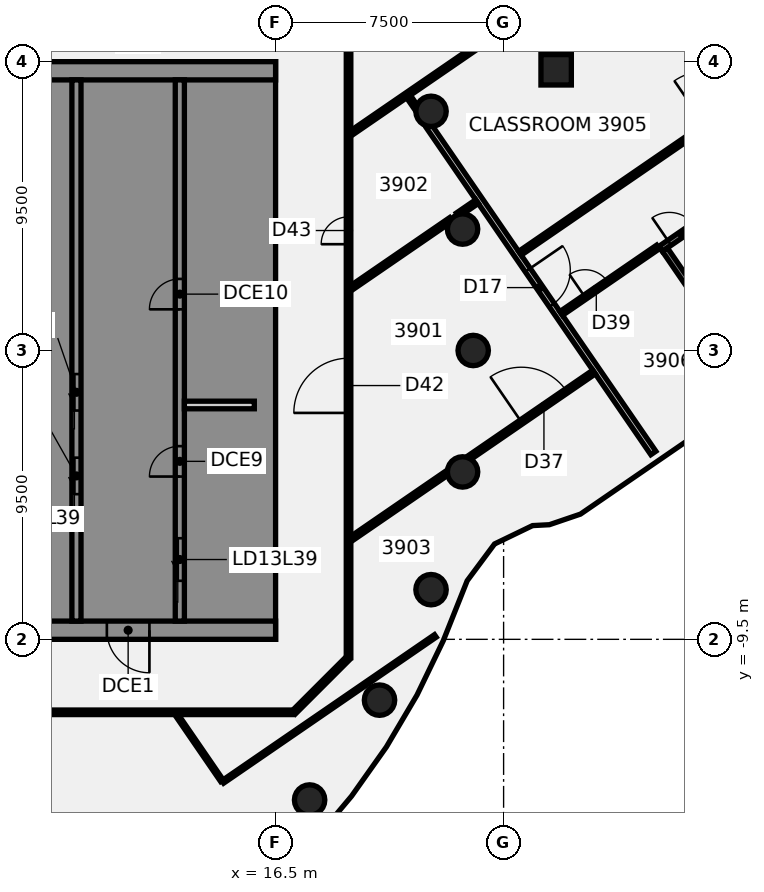
"""IFC4 building model, lengths in metres.
Left out: names, types, materials, properties, quantities, classifications, styles, units other than length and angle.
Written with IfcOpenShell. Run it as: python <this file> out.ifc"""

import sys

from ifc_helpers import new_model, si_unit, direction, frame, frame_2d, origin, origin_2d, place, context, subcontext, project, spatial, polyline, rectangle, circle, outline, extrude, element, fill, save


model = new_model("IFC4")
c1 = context("Model", 3, precision=1e-05, world=origin(), true_north=direction((0.0, 1.0)))
c2 = subcontext(c1, "Body", "Model", "MODEL_VIEW")
j1 = project(units=[si_unit("LENGTHUNIT", "METRE"), si_unit("PLANEANGLEUNIT", "RADIAN")], contexts=[c1])
p1 = place(None, origin())
s1 = spatial("IfcSite", under=j1, at=p1, CompositionType="ELEMENT")
p2 = place(p1, origin())
s2 = spatial("IfcBuilding", under=s1, at=p2, CompositionType="ELEMENT")
p3 = place(p2, frame((0.0, 0.0, 159.25)))
s3 = spatial("IfcBuildingStorey", under=s2, at=p3, CompositionType="ELEMENT", Elevation=159.25)
for number, where, z_axis, x_axis in (
    (1, (23.0, 0.0, -0.14), (0.0, 0.0, 1.0), (1.0, 0.0, 0.0)),
    (2, (22.651, 3.994, -0.14), (0.0, 0.0, 1.0), (1.0, 0.0, 0.0)),
    (3, (21.613, 7.866, -0.14), (0.0, 0.0, 1.0), (1.0, 0.0, 0.0)),
    (4, (17.619, -14.784, -0.14), (0.0, 0.0, 1.0), (1.0, 0.0, 0.0)),
    (5, (19.919, -11.5, -0.14), (0.0, 0.0, 1.0), (1.0, 0.0, 0.0)),
    (6, (21.613, -7.866, -0.14), (0.0, 0.0, 1.0), (1.0, 0.0, 0.0)),
    (7, (22.651, -3.994, -0.14), (0.0, 0.0, 1.0), (1.0, 0.0, 0.0)),
):
    element("IfcColumn", number, at=place(p3, frame(where, z_axis=z_axis, x_axis=x_axis)), inside=s3, PredefinedType="COLUMN", context=c2, shape_type="SweptSolid", body=[
        extrude(circle(Radius=0.5, at=origin_2d()), origin(), (0.0, 0.0, 1.0), 3.75),
    ])
p4 = place(p3, frame((25.729, 9.232, -0.139), z_axis=(-0.045031564951, 0.017700268305, 0.998828743409), x_axis=(0.565346981638, -0.82387846187, 0.040088282815)))
e8 = element("IfcColumn", 8, at=p4, inside=s3, PredefinedType="COLUMN", context=c2, shape_type="SweptSolid", body=[
    extrude(rectangle(XDim=1.0, YDim=1.0, at=origin_2d()), origin(), (0.0, 0.0, 1.0), 3.752),
])
p5 = place(p3, frame((2.344, -11.987, 0.0), z_axis=(0.0, 0.0, 1.0), x_axis=(0.566059881592, -0.824364124918, 0.0)))
e9 = element("IfcWall", 9, at=p5, inside=s3, PredefinedType="PARTITIONING", context=c2, shape_type="SweptSolid", body=[
    extrude(rectangle(XDim=13.547, YDim=0.1, at=frame_2d((6.773, 0.0))), origin(), (0.0, 0.0, 1.0), 3.01),
])
p6 = place(p3, frame((13.249, -11.987, 0.0), z_axis=(0.0, 0.0, 1.0), x_axis=(0.566181157167, -0.824280836408, 0.0)))
e10 = element("IfcWall", 10, at=p6, inside=s3, PredefinedType="PARTITIONING", context=c2, shape_type="SweptSolid", body=[
    extrude(rectangle(XDim=2.623, YDim=0.1, at=frame_2d((1.312, 0.0))), origin(), (0.0, 0.0, 1.0), 3.01),
])
p7 = place(p3, frame((20.875, 8.35, 0.0), z_axis=(0.0, 0.0, 1.0), x_axis=(0.56618647865, -0.824277181168, 0.0)))
e11 = element("IfcWall", 11, at=p7, inside=s3, PredefinedType="PARTITIONING", context=c2, shape_type="SweptSolid", body=[
    extrude(rectangle(XDim=0.454, YDim=0.15, at=frame_2d((0.227, 0.0))), origin(), (0.0, 0.0, 1.0), 3.01),
])
p8 = place(p3, frame((21.545, 7.375, 0.0), z_axis=(0.0, 0.0, 1.0), x_axis=(0.566178235937, -0.824282842932, 0.0)))
e12 = element("IfcWall", 12, at=p8, inside=s3, PredefinedType="PARTITIONING", context=c2, shape_type="SweptSolid", body=[
    extrude(rectangle(XDim=13.035, YDim=0.2, at=frame_2d((6.518, 0.0))), origin(), (0.0, 0.0, 1.0), 3.01),
])
p9 = place(p8, frame((5.737, 0.0, 0.0)))
e13 = element("IfcOpeningElement", 13, at=p9, cuts=e12, PredefinedType="OPENING", context=c2, shape_type="SweptSolid", body=[
    extrude(rectangle(XDim=1.4, YDim=2.1, at=frame_2d((0.7, 1.05))), frame((0.0, 0.11, 0.0), z_axis=(0.0, -1.0, 0.0), x_axis=(1.0, 0.0, 0.0)), (0.0, 0.0, 1.0), 0.22),
])
p10 = place(p3, frame((-17.1, -11.9, 0.0), z_axis=(0.0, 0.0, 1.0), x_axis=(1.0, 0.0, 0.0)))
e14 = element("IfcWall", 14, at=p10, inside=s3, PredefinedType="PARTITIONING", context=c2, shape_type="SweptSolid", body=[
    extrude(rectangle(XDim=34.165, YDim=0.15, at=frame_2d((17.083, 0.0))), origin(), (0.0, 0.0, 1.0), 3.01),
])
p11 = place(p10, frame((9.777, 0.0, 0.0)))
e15 = element("IfcOpeningElement", 15, at=p11, cuts=e14, PredefinedType="OPENING", context=c2, shape_type="SweptSolid", body=[
    extrude(rectangle(XDim=1.8, YDim=2.1, at=frame_2d((0.9, 1.05))), frame((0.0, 0.085, 0.0), z_axis=(0.0, -1.0, 0.0), x_axis=(1.0, 0.0, 0.0)), (0.0, 0.0, 1.0), 0.17),
])
p12 = place(p10, frame((1.95, 0.0, 0.0)))
e16 = element("IfcOpeningElement", 16, at=p12, cuts=e14, PredefinedType="OPENING", context=c2, shape_type="SweptSolid", body=[
    extrude(rectangle(XDim=1.8, YDim=2.1, at=frame_2d((0.9, 1.05))), frame((0.0, 0.085, 0.0), z_axis=(0.0, -1.0, 0.0), x_axis=(1.0, 0.0, 0.0)), (0.0, 0.0, 1.0), 0.17),
])
p13 = place(p10, frame((23.884, 0.0, 0.0)))
e17 = element("IfcOpeningElement", 17, at=p13, cuts=e14, PredefinedType="OPENING", context=c2, shape_type="SweptSolid", body=[
    extrude(rectangle(XDim=1.8, YDim=2.1, at=frame_2d((0.9, 1.05))), frame((0.0, 0.085, 0.0), z_axis=(0.0, -1.0, 0.0), x_axis=(1.0, 0.0, 0.0)), (0.0, 0.0, 1.0), 0.17),
])
p14 = place(p3, frame((14.762, -14.19, 0.0), z_axis=(0.0, 0.0, 1.0), x_axis=(0.824347457756, 0.566084153542, 0.0)))
e18 = element("IfcWall", 18, at=p14, inside=s3, PredefinedType="PARTITIONING", context=c2, shape_type="SweptSolid", body=[
    extrude(rectangle(XDim=8.483, YDim=0.1, at=frame_2d((4.242, 0.0))), origin(), (0.0, 0.0, 1.0), 3.01),
])
p15 = place(p3, frame((18.999, -6.185, 0.0), z_axis=(0.0, 0.0, 1.0), x_axis=(0.824392319221, 0.566018819484, 0.0)))
e19 = element("IfcWall", 19, at=p15, inside=s3, PredefinedType="PARTITIONING", context=c2, shape_type="SweptSolid", body=[
    extrude(rectangle(XDim=3.82, YDim=0.15, at=frame_2d((1.91, 0.0))), origin(), (0.0, 0.0, 1.0), 3.01),
])
p16 = place(p3, frame((22.854, -3.538, 0.0), z_axis=(0.0, 0.0, 1.0), x_axis=(0.824360979783, 0.566064461887, 0.0)))
e20 = element("IfcWall", 20, at=p16, inside=s3, PredefinedType="PARTITIONING", context=c2, shape_type="SweptSolid", body=[
    extrude(rectangle(XDim=4.999, YDim=0.15, at=frame_2d((2.5, 0.0))), origin(), (0.0, 0.0, 1.0), 3.01),
])
p17 = place(p16, frame((2.1, 0.0, 0.0)))
e21 = element("IfcOpeningElement", 21, at=p17, cuts=e20, PredefinedType="OPENING", context=c2, shape_type="SweptSolid", body=[
    extrude(rectangle(XDim=1.8, YDim=2.1, at=frame_2d((0.9, 1.05))), frame((0.0, 0.085, 0.0), z_axis=(0.0, -1.0, 0.0), x_axis=(1.0, 0.0, 0.0)), (0.0, 0.0, 1.0), 0.17),
])
p18 = place(p3, frame((18.999, 2.064, 0.0), z_axis=(0.0, 0.0, 1.0), x_axis=(0.824390062348, 0.566022106549, 0.0)))
e22 = element("IfcWall", 22, at=p18, inside=s3, PredefinedType="PARTITIONING", context=c2, shape_type="SweptSolid", body=[
    extrude(rectangle(XDim=3.968, YDim=0.15, at=frame_2d((1.984, 0.0))), origin(), (0.0, 0.0, 1.0), 3.01),
])
p19 = place(p3, frame((22.49, 4.461, 0.0), z_axis=(0.0, 0.0, 1.0), x_axis=(0.82422658894, 0.566260125812, 0.0)))
e23 = element("IfcWall", 23, at=p19, inside=s3, PredefinedType="PARTITIONING", context=c2, shape_type="SweptSolid", body=[
    extrude(rectangle(XDim=0.771, YDim=0.15, at=frame_2d((0.386, 0.0))), origin(), (0.0, 0.0, 1.0), 3.01),
])
p20 = place(p3, frame((18.999, 7.159, 0.0), z_axis=(0.0, 0.0, 1.0), x_axis=(0.824433154218, 0.565959339728, 0.0)))
e24 = element("IfcWall", 24, at=p20, inside=s3, PredefinedType="PARTITIONING", context=c2, shape_type="SweptSolid", body=[
    extrude(rectangle(XDim=5.041, YDim=0.15, at=frame_2d((2.521, 0.0))), origin(), (0.0, 0.0, 1.0), 3.01),
])
p21 = place(p3, frame((24.54, 3.199, 0.0), z_axis=(0.0, 0.0, 1.0), x_axis=(0.824324281839, 0.566117901475, 0.0)))
e25 = element("IfcWall", 25, at=p21, inside=s3, PredefinedType="PARTITIONING", context=c2, shape_type="SweptSolid", body=[
    extrude(rectangle(XDim=13.316, YDim=0.15, at=frame_2d((6.658, 0.0))), origin(), (0.0, 0.0, 1.0), 3.01),
])
p22 = place(p21, frame((7.395, 0.0, 0.0)))
e26 = element("IfcOpeningElement", 26, at=p22, cuts=e25, PredefinedType="OPENING", context=c2, shape_type="SweptSolid", body=[
    extrude(rectangle(XDim=1.8, YDim=2.1, at=frame_2d((0.9, 1.05))), frame((0.0, 0.085, 0.0), z_axis=(0.0, -1.0, 0.0), x_axis=(1.0, 0.0, 0.0)), (0.0, 0.0, 1.0), 0.17),
])
p23 = place(p3, frame((25.894, 1.219, 0.0), z_axis=(0.0, 0.0, 1.0), x_axis=(0.82439240616, 0.566018692859, 0.0)))
e27 = element("IfcWall", 27, at=p23, inside=s3, PredefinedType="PARTITIONING", context=c2, shape_type="SweptSolid", body=[
    extrude(rectangle(XDim=3.86, YDim=0.15, at=frame_2d((1.93, 0.0))), origin(), (0.0, 0.0, 1.0), 3.01),
])
p24 = place(p23, frame((0.95, 0.0, 0.0)))
e28 = element("IfcOpeningElement", 28, at=p24, cuts=e27, PredefinedType="OPENING", context=c2, shape_type="SweptSolid", body=[
    extrude(rectangle(XDim=0.9, YDim=2.1, at=frame_2d((0.45, 1.05))), frame((0.0, 0.085, 0.0), z_axis=(0.0, -1.0, 0.0), x_axis=(1.0, 0.0, 0.0)), (0.0, 0.0, 1.0), 0.17),
])
p25 = place(p3, frame((17.1, -11.9, 0.0), z_axis=(0.0, 0.0, 1.0), x_axis=(0.707106781187, 0.707106781187, 0.0)))
e29 = element("IfcWall", 29, at=p25, inside=s3, PredefinedType="PARTITIONING", context=c2, shape_type="SweptSolid", body=[
    extrude(rectangle(XDim=2.505, YDim=0.15, at=frame_2d((1.253, 0.0))), origin(), (0.0, 0.0, 1.0), 3.01),
])
p26 = place(p3, frame((18.9, -10.1, 0.0), z_axis=(0.0, 0.0, 1.0), x_axis=(0.0, 1.0, 0.0)))
e30 = element("IfcWall", 30, at=p26, inside=s3, PredefinedType="PARTITIONING", context=c2, shape_type="SweptSolid", body=[
    extrude(rectangle(XDim=20.2, YDim=0.15, at=frame_2d((10.1, 0.0))), origin(), (0.0, 0.0, 1.0), 3.01),
])
p27 = place(p26, frame((8.047, 0.0, 0.0)))
e31 = element("IfcOpeningElement", 31, at=p27, cuts=e30, PredefinedType="OPENING", context=c2, shape_type="SweptSolid", body=[
    extrude(rectangle(XDim=1.8, YDim=2.1, at=frame_2d((0.9, 1.05))), frame((0.0, 0.085, 0.0), z_axis=(0.0, -1.0, 0.0), x_axis=(1.0, 0.0, 0.0)), (0.0, 0.0, 1.0), 0.17),
])
p28 = place(p26, frame((13.596, 0.0, 0.0)))
e32 = element("IfcOpeningElement", 32, at=p28, cuts=e30, PredefinedType="OPENING", context=c2, shape_type="SweptSolid", body=[
    extrude(rectangle(XDim=0.9, YDim=2.1, at=frame_2d((0.45, 1.05))), frame((0.0, 0.085, 0.0), z_axis=(0.0, -1.0, 0.0), x_axis=(1.0, 0.0, 0.0)), (0.0, 0.0, 1.0), 0.17),
])
p29 = place(p3, frame((16.5, -9.2, 0.0), z_axis=(0.0, 0.0, 1.0), x_axis=(-1.0, 0.0, 0.0)))
e33 = element("IfcWall", 33, at=p29, inside=s3, PredefinedType="SHEAR", context=c2, shape_type="SweptSolid", body=[
    extrude(rectangle(XDim=13.0, YDim=0.6, at=frame_2d((6.5, 0.0))), origin(), (0.0, 0.0, 1.0), 3.61),
])
p30 = place(p29, frame((4.15, 0.0, 0.0)))
e34 = element("IfcOpeningElement", 34, at=p30, cuts=e33, PredefinedType="OPENING", context=c2, shape_type="SweptSolid", body=[
    extrude(rectangle(XDim=1.4, YDim=2.1, at=frame_2d((0.7, 1.05))), frame((0.0, 0.31, 0.0), z_axis=(0.0, -1.0, 0.0), x_axis=(1.0, 0.0, 0.0)), (0.0, 0.0, 1.0), 0.62),
])
p31 = place(p29, frame((10.125, 0.0, 0.0)))
e35 = element("IfcOpeningElement", 35, at=p31, cuts=e33, PredefinedType="OPENING", context=c2, shape_type="SweptSolid", body=[
    extrude(rectangle(XDim=1.4, YDim=2.1, at=frame_2d((0.7, 1.05))), frame((0.0, 0.31, 0.0), z_axis=(0.0, -1.0, 0.0), x_axis=(1.0, 0.0, 0.0)), (0.0, 0.0, 1.0), 0.62),
])
p32 = place(p3, origin())
e36 = element("IfcWall", 36, at=p32, inside=s3, PredefinedType="SHEAR", context=c2, shape_type="SweptSolid", body=[
    extrude(outline(polyline([(13.5, -8.125), (13.5, -8.9), (15.9, -8.9), (16.5, -8.9), (16.5, 8.9), (15.9, 8.9), (13.5, 8.9), (13.5, 8.125), (15.9, 8.125), (15.9, 5.625), (13.5, 5.625), (13.5, 5.375), (15.9, 5.375), (15.9, -5.375), (13.5, -5.375), (13.5, -5.625), (15.9, -5.625), (15.9, -8.125), (13.5, -8.125)])), origin(), (0.0, 0.0, 1.0), 3.61),
])
p33 = place(p3, frame((16.5, 9.2, 0.0), z_axis=(0.0, 0.0, 1.0), x_axis=(-1.0, 0.0, 0.0)))
e37 = element("IfcWall", 37, at=p33, inside=s3, PredefinedType="SHEAR", context=c2, shape_type="SweptSolid", body=[
    extrude(rectangle(XDim=13.0, YDim=0.6, at=frame_2d((6.5, 0.0))), origin(), (0.0, 0.0, 1.0), 3.61),
])
p34 = place(p3, origin())
e38 = element("IfcWall", 38, at=p34, inside=s3, PredefinedType="SHEAR", context=c2, shape_type="SweptSolid", body=[
    extrude(outline(polyline([(9.8, -5.375), (7.5, -5.375), (7.5, -2.875), (9.8, -2.875), (9.8, -2.625), (7.5, -2.625), (7.5, -0.125), (9.8, -0.125), (9.8, 0.125), (7.5, 0.125), (7.5, 2.625), (9.8, 2.625), (9.8, 2.875), (7.5, 2.875), (7.5, 5.375), (9.8, 5.375), (9.8, 5.625), (7.5, 5.625), (7.5, 8.125), (9.8, 8.125), (9.8, 8.9), (7.5, 8.9), (7.2, 8.9), (7.2, -5.625), (7.5, -5.625), (9.8, -5.625), (9.8, -5.375)])), origin(), (0.0, 0.0, 1.0), 3.61),
])
p35 = place(p3, origin())
e39 = element("IfcWall", 39, at=p35, inside=s3, PredefinedType="SHEAR", context=c2, shape_type="SweptSolid", body=[
    extrude(outline(polyline([(7.5, -8.125), (7.5, -8.9), (9.8, -8.9), (9.8, -8.125), (9.8, -5.625), (9.55, -5.625), (9.55, -8.125), (7.5, -8.125)])), origin(), (0.0, 0.0, 1.0), 3.61),
])
p36 = place(p3, frame((13.35, -8.9, 0.0), z_axis=(0.0, 0.0, 1.0), x_axis=(0.0, 1.0, 0.0)))
e40 = element("IfcWall", 40, at=p36, inside=s3, PredefinedType="SHEAR", context=c2, shape_type="SweptSolid", body=[
    extrude(rectangle(XDim=17.8, YDim=0.3, at=frame_2d((8.9, 0.0))), origin(), (0.0, 0.0, 1.0), 3.61),
])
p37 = place(p36, frame((1.325, 0.0, 0.0)))
e41 = element("IfcOpeningElement", 41, at=p37, cuts=e40, PredefinedType="OPENING", context=c2, shape_type="SweptSolid", body=[
    extrude(rectangle(XDim=1.4, YDim=2.1, at=frame_2d((0.7, 1.05))), frame((0.0, 0.16, 0.0), z_axis=(0.0, -1.0, 0.0), x_axis=(1.0, 0.0, 0.0)), (0.0, 0.0, 1.0), 0.32),
])
p38 = place(p36, frame((4.754, 0.0, 0.0)))
e42 = element("IfcOpeningElement", 42, at=p38, cuts=e40, PredefinedType="OPENING", context=c2, shape_type="SweptSolid", body=[
    extrude(rectangle(XDim=1.0, YDim=2.1, at=frame_2d((0.5, 1.05))), frame((0.0, 0.16, 0.0), z_axis=(0.0, -1.0, 0.0), x_axis=(1.0, 0.0, 0.0)), (0.0, 0.0, 1.0), 0.32),
])
p39 = place(p36, frame((10.254, 0.0, 0.0)))
e43 = element("IfcOpeningElement", 43, at=p39, cuts=e40, PredefinedType="OPENING", context=c2, shape_type="SweptSolid", body=[
    extrude(rectangle(XDim=1.0, YDim=2.1, at=frame_2d((0.5, 1.05))), frame((0.0, 0.16, 0.0), z_axis=(0.0, -1.0, 0.0), x_axis=(1.0, 0.0, 0.0)), (0.0, 0.0, 1.0), 0.32),
])
p40 = place(p3, frame((9.95, -8.9, 0.0), z_axis=(0.0, 0.0, 1.0), x_axis=(0.0, 1.0, 0.0)))
e44 = element("IfcWall", 44, at=p40, inside=s3, PredefinedType="SHEAR", context=c2, shape_type="SweptSolid", body=[
    extrude(rectangle(XDim=17.8, YDim=0.3, at=frame_2d((8.9, 0.0))), origin(), (0.0, 0.0, 1.0), 3.61),
])
p41 = place(p40, frame((4.175, 0.0, 0.0)))
e45 = element("IfcOpeningElement", 45, at=p41, cuts=e44, PredefinedType="OPENING", context=c2, shape_type="SweptSolid", body=[
    extrude(rectangle(XDim=1.2, YDim=2.1, at=frame_2d((0.6, 1.05))), frame((0.0, 0.16, 0.0), z_axis=(0.0, -1.0, 0.0), x_axis=(1.0, 0.0, 0.0)), (0.0, 0.0, 1.0), 0.32),
])
p42 = place(p40, frame((6.925, 0.0, 0.0)))
e46 = element("IfcOpeningElement", 46, at=p42, cuts=e44, PredefinedType="OPENING", context=c2, shape_type="SweptSolid", body=[
    extrude(rectangle(XDim=1.2, YDim=2.1, at=frame_2d((0.6, 1.05))), frame((0.0, 0.16, 0.0), z_axis=(0.0, -1.0, 0.0), x_axis=(1.0, 0.0, 0.0)), (0.0, 0.0, 1.0), 0.32),
])
p43 = place(p3, frame((15.8, -1.792, 0.0), z_axis=(0.0, 0.0, 1.0), x_axis=(-1.0, 0.0, 0.0)))
e47 = element("IfcWall", 47, at=p43, inside=s3, PredefinedType="PARTITIONING", context=c2, shape_type="SweptSolid", body=[
    extrude(rectangle(XDim=2.3, YDim=0.25, at=frame_2d((1.15, 0.0))), origin(), (0.0, 0.0, 1.0), 3.61),
])
p44 = place(p3, frame((29.166, 3.344, -0.14), z_axis=(0.0, 0.0, 1.0), x_axis=(0.824341639897, 0.566092625577, 0.0)))
e48 = element("IfcWall", 48, at=p44, inside=s3, PredefinedType="SHEAR", context=c2, shape_type="SweptSolid", body=[
    extrude(rectangle(XDim=6.7, YDim=0.2, at=frame_2d((3.35, 0.0))), origin(), (0.0, 0.0, 1.0), 3.15),
])
p45 = place(p44, frame((0.35, 0.0, 0.0)))
e49 = element("IfcOpeningElement", 49, at=p45, cuts=e48, PredefinedType="OPENING", context=c2, shape_type="SweptSolid", body=[
    extrude(rectangle(XDim=1.0, YDim=2.1, at=frame_2d((0.5, 1.05))), frame((0.0, 0.11, 0.0), z_axis=(0.0, -1.0, 0.0), x_axis=(1.0, 0.0, 0.0)), (0.0, 0.0, 1.0), 0.22),
])
p46 = place(p3, frame((31.116, 0.68, -0.14), z_axis=(0.0, 0.0, 1.0), x_axis=(-0.566091628667, 0.824342324494, 0.0)))
e50 = element("IfcWall", 50, at=p46, inside=s3, PredefinedType="SHEAR", context=c2, shape_type="SweptSolid", body=[
    extrude(rectangle(XDim=3.2, YDim=0.2, at=frame_2d((1.6, 0.0))), origin(), (0.0, 0.0, 1.0), 3.15),
])
p47 = place(p9, frame((1.4, 0.0, 0.0), z_axis=(0.0, 0.0, 1.0), x_axis=(-1.0, 0.0, 0.0)))
e51 = element("IfcDoor", 51, at=p47, inside=s3, OperationType="DOUBLE_DOOR_SINGLE_SWING", PredefinedType="DOOR", context=c2, shape_type="SweptSolid", body=[
    extrude(rectangle(XDim=1.4, YDim=2.1, at=frame_2d((0.7, 1.05))), frame((0.0, 0.025, 0.0), z_axis=(0.0, -1.0, 0.0), x_axis=(1.0, 0.0, 0.0)), (0.0, 0.0, 1.0), 0.05),
])
fill(e13, e51)
p48 = place(p17, frame((1.8, 0.0, 0.0), z_axis=(0.0, 0.0, 1.0), x_axis=(-1.0, 0.0, 0.0)))
e52 = element("IfcDoor", 52, at=p48, inside=s3, OperationType="DOUBLE_DOOR_SINGLE_SWING", PredefinedType="DOOR", context=c2, shape_type="SweptSolid", body=[
    extrude(rectangle(XDim=1.8, YDim=2.1, at=frame_2d((0.9, 1.05))), frame((0.0, 0.025, 0.0), z_axis=(0.0, -1.0, 0.0), x_axis=(1.0, 0.0, 0.0)), (0.0, 0.0, 1.0), 0.05),
])
fill(e21, e52)
p49 = place(p24, frame((0.9, 0.0, 0.0), z_axis=(0.0, 0.0, 1.0), x_axis=(-1.0, 0.0, 0.0)))
e53 = element("IfcDoor", 53, at=p49, inside=s3, OperationType="SINGLE_SWING_LEFT", PredefinedType="DOOR", context=c2, shape_type="SweptSolid", body=[
    extrude(rectangle(XDim=0.9, YDim=2.1, at=frame_2d((0.45, 1.05))), frame((0.0, 0.025, 0.0), z_axis=(0.0, -1.0, 0.0), x_axis=(1.0, 0.0, 0.0)), (0.0, 0.0, 1.0), 0.05),
])
fill(e28, e53)
p50 = place(p27, origin())
e54 = element("IfcDoor", 54, at=p50, inside=s3, OperationType="DOUBLE_DOOR_SINGLE_SWING", PredefinedType="DOOR", context=c2, shape_type="SweptSolid", body=[
    extrude(rectangle(XDim=1.8, YDim=2.1, at=frame_2d((0.9, 1.05))), frame((0.0, 0.025, 0.0), z_axis=(0.0, -1.0, 0.0), x_axis=(1.0, 0.0, 0.0)), (0.0, 0.0, 1.0), 0.05),
])
fill(e31, e54)
p51 = place(p28, frame((0.9, 0.0, 0.0), z_axis=(0.0, 0.0, 1.0), x_axis=(-1.0, 0.0, 0.0)))
e55 = element("IfcDoor", 55, at=p51, inside=s3, OperationType="SINGLE_SWING_RIGHT", PredefinedType="DOOR", context=c2, shape_type="SweptSolid", body=[
    extrude(rectangle(XDim=0.9, YDim=2.1, at=frame_2d((0.45, 1.05))), frame((0.0, 0.025, 0.0), z_axis=(0.0, -1.0, 0.0), x_axis=(1.0, 0.0, 0.0)), (0.0, 0.0, 1.0), 0.05),
])
fill(e32, e55)
p52 = place(p30, origin())
e56 = element("IfcDoor", 56, at=p52, inside=s3, OperationType="SINGLE_SWING_LEFT", PredefinedType="DOOR", context=c2, shape_type="SweptSolid", body=[
    extrude(rectangle(XDim=1.4, YDim=2.1, at=frame_2d((0.7, 1.05))), frame((0.0, 0.025, 0.0), z_axis=(0.0, -1.0, 0.0), x_axis=(1.0, 0.0, 0.0)), (0.0, 0.0, 1.0), 0.05),
])
fill(e34, e56)
p53 = place(p37, origin())
e57 = element("IfcDoor", 57, at=p53, inside=s3, OperationType="SLIDING_TO_LEFT", PredefinedType="DOOR", context=c2, shape_type="SweptSolid", body=[
    extrude(rectangle(XDim=1.4, YDim=2.1, at=frame_2d((0.7, 1.05))), frame((0.0, 0.025, 0.0), z_axis=(0.0, -1.0, 0.0), x_axis=(1.0, 0.0, 0.0)), (0.0, 0.0, 1.0), 0.05),
])
fill(e41, e57)
p54 = place(p41, origin())
e58 = element("IfcDoor", 58, at=p54, inside=s3, OperationType="SLIDING_TO_LEFT", PredefinedType="DOOR", context=c2, shape_type="SweptSolid", body=[
    extrude(rectangle(XDim=1.2, YDim=2.1, at=frame_2d((0.6, 1.05))), frame((0.0, 0.025, 0.0), z_axis=(0.0, -1.0, 0.0), x_axis=(1.0, 0.0, 0.0)), (0.0, 0.0, 1.0), 0.05),
])
fill(e45, e58)
p55 = place(p42, origin())
e59 = element("IfcDoor", 59, at=p55, inside=s3, OperationType="SLIDING_TO_LEFT", PredefinedType="DOOR", context=c2, shape_type="SweptSolid", body=[
    extrude(rectangle(XDim=1.2, YDim=2.1, at=frame_2d((0.6, 1.05))), frame((0.0, 0.025, 0.0), z_axis=(0.0, -1.0, 0.0), x_axis=(1.0, 0.0, 0.0)), (0.0, 0.0, 1.0), 0.05),
])
fill(e46, e59)
p56 = place(p38, origin())
e60 = element("IfcDoor", 60, at=p56, inside=s3, OperationType="SINGLE_SWING_LEFT", PredefinedType="DOOR", context=c2, shape_type="SweptSolid", body=[
    extrude(rectangle(XDim=1.0, YDim=2.1, at=frame_2d((0.5, 1.05))), frame((0.0, 0.025, 0.0), z_axis=(0.0, -1.0, 0.0), x_axis=(1.0, 0.0, 0.0)), (0.0, 0.0, 1.0), 0.05),
])
fill(e42, e60)
p57 = place(p39, origin())
e61 = element("IfcDoor", 61, at=p57, inside=s3, OperationType="SINGLE_SWING_LEFT", PredefinedType="DOOR", context=c2, shape_type="SweptSolid", body=[
    extrude(rectangle(XDim=1.0, YDim=2.1, at=frame_2d((0.5, 1.05))), frame((0.0, 0.025, 0.0), z_axis=(0.0, -1.0, 0.0), x_axis=(1.0, 0.0, 0.0)), (0.0, 0.0, 1.0), 0.05),
])
fill(e43, e61)
p58 = place(p45, origin())
e62 = element("IfcDoor", 62, at=p58, inside=s3, OperationType="SINGLE_SWING_LEFT", PredefinedType="DOOR", context=c2, shape_type="SweptSolid", body=[
    extrude(rectangle(XDim=1.0, YDim=2.1, at=frame_2d((0.5, 1.05))), frame((0.0, 0.025, 0.0), z_axis=(0.0, -1.0, 0.0), x_axis=(1.0, 0.0, 0.0)), (0.0, 0.0, 1.0), 0.05),
])
fill(e49, e62)
save(model, sys.argv[1])
